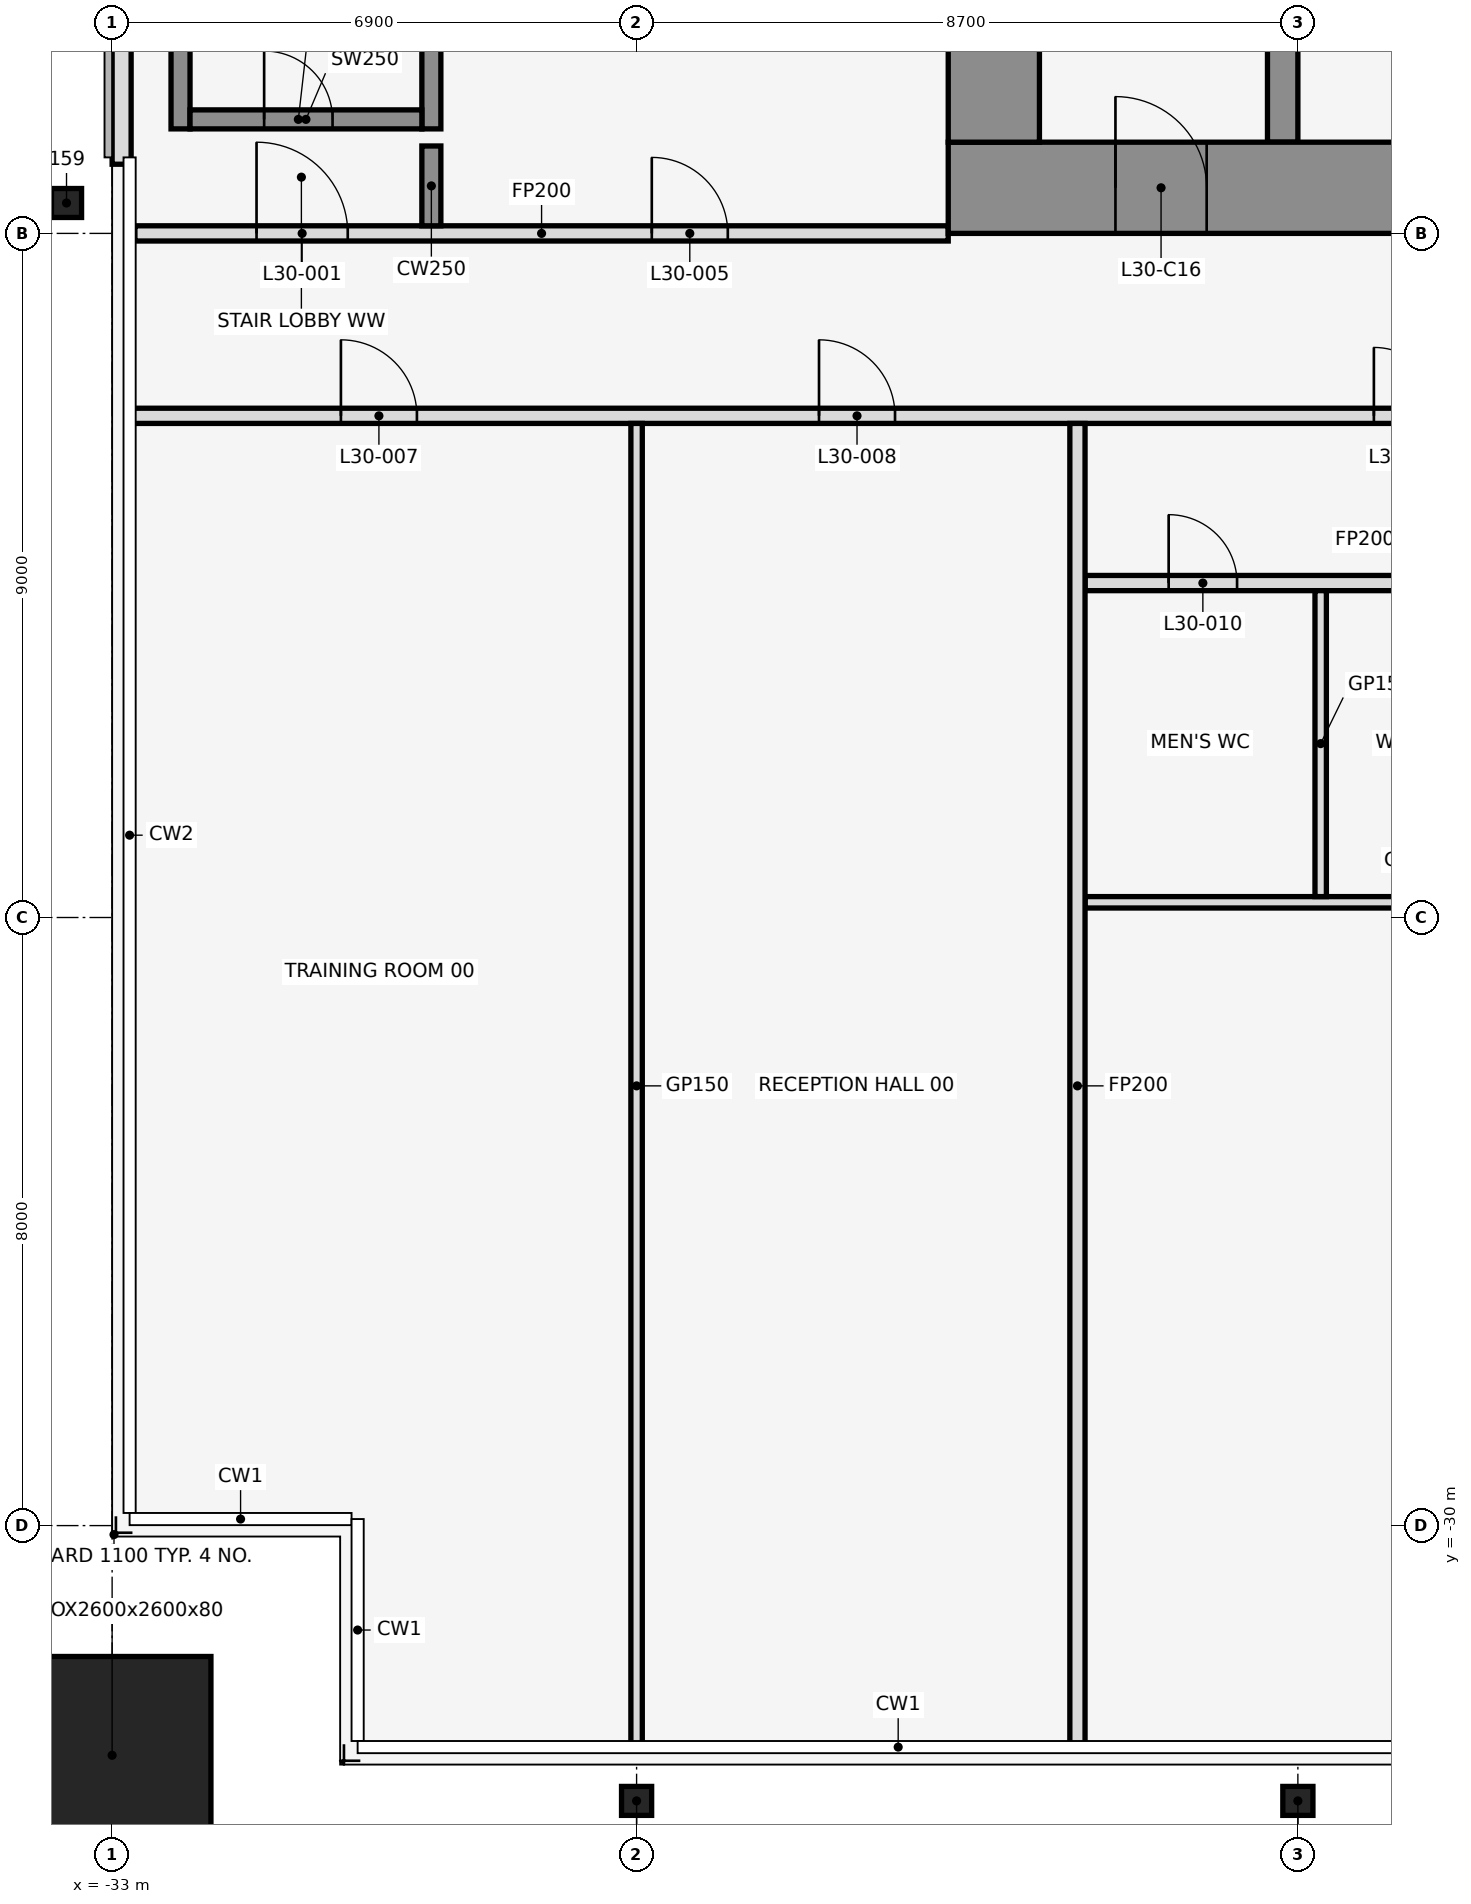
"""IFC4 building model, lengths in metres.
Left out: names, types, materials, properties, quantities, classifications, styles, units other than length and angle.
Written with IfcOpenShell. Run it as: python <this file> out.ifc"""

import sys

from ifc_helpers import new_model, si_unit, direction, frame, frame_2d, origin, origin_2d, place, context, subcontext, project, spatial, rectangle, hollow_rectangle, i_section, extrude, element, fill, save


model = new_model("IFC4")
c1 = context("Model", 3, precision=1e-05, world=origin(), true_north=direction((0.0, 1.0)))
c2 = subcontext(c1, "Body", "Model", "MODEL_VIEW")
j1 = project(units=[si_unit("LENGTHUNIT", "METRE"), si_unit("PLANEANGLEUNIT", "RADIAN")], contexts=[c1])
p1 = place(None, origin())
s1 = spatial("IfcSite", under=j1, at=p1, CompositionType="ELEMENT")
p2 = place(p1, origin())
s2 = spatial("IfcBuilding", under=s1, at=p2, CompositionType="ELEMENT")
p3 = place(p2, frame((0.0, 0.0, 140.4)))
s3 = spatial("IfcBuildingStorey", under=s2, at=p3, CompositionType="ELEMENT", Elevation=140.4)
p4 = place(p3, frame((-33.0, -33.022, 0.0), z_axis=(0.0, 0.0, 1.0), x_axis=(1.0, 0.0, 0.0)))
e1 = element("IfcColumn", 1, at=p4, inside=s3, PredefinedType="COLUMN", context=c2, shape_type="SweptSolid", body=[
    extrude(hollow_rectangle(XDim=2.6, YDim=2.6, WallThickness=0.08, at=origin_2d()), origin(), (0.0, 0.0, 1.0), 4.1),
])
for number, where, z_axis, x_axis in (
    (2, (-26.1, -33.622, 0.0), (0.0, 0.0, 1.0), (1.0, 0.0, 0.0)),
    (3, (-17.4, -33.622, 0.0), (0.0, 0.0, 1.0), (1.0, 0.0, 0.0)),
    (4, (-33.6, -12.6, 0.0), (0.0, 0.0, 1.0), (1.0, 0.0, 0.0)),
):
    element("IfcColumn", number, at=place(p3, frame(where, z_axis=z_axis, x_axis=x_axis)), inside=s3, PredefinedType="COLUMN", context=c2, shape_type="SweptSolid", body=[
        extrude(i_section(OverallWidth=0.396, OverallDepth=0.381, WebThickness=0.019, FlangeThickness=0.03, at=origin_2d()), origin(), (0.0, 0.0, 1.0), 4.1),
    ])
p5 = place(p3, frame((-32.875, -6.0, 0.0), z_axis=(0.0, 0.0, 1.0), x_axis=(0.0, -1.0, 0.0)))
e5 = element("IfcWall", 5, at=p5, inside=s3, PredefinedType="STANDARD", context=c2, shape_type="SweptSolid", body=[
    extrude(rectangle(XDim=6.09, YDim=0.25, at=frame_2d((3.045, 0.0))), origin(), (0.0, 0.0, 1.0), 3.95),
])
p6 = place(p3, frame((-32.1, -11.625, 0.0), z_axis=(0.0, 0.0, 1.0), x_axis=(0.0, 1.0, 0.0)))
e6 = element("IfcWall", 6, at=p6, inside=s3, PredefinedType="SHEAR", context=c2, shape_type="SweptSolid", body=[
    extrude(rectangle(XDim=7.325, YDim=0.25, at=frame_2d((3.663, 0.0))), origin(), (0.0, 0.0, 1.0), 4.1),
])
p7 = place(p3, frame((-28.8, -11.625, 0.0), z_axis=(0.0, 0.0, 1.0), x_axis=(0.0, 1.0, 0.0)))
e7 = element("IfcWall", 7, at=p7, inside=s3, PredefinedType="SHEAR", context=c2, shape_type="SweptSolid", body=[
    extrude(rectangle(XDim=7.25, YDim=0.25, at=frame_2d((3.625, 0.0))), origin(), (0.0, 0.0, 1.0), 4.1),
])
p8 = place(p3, frame((-31.975, -11.5, 0.0), z_axis=(0.0, 0.0, 1.0), x_axis=(1.0, 0.0, 0.0)))
e8 = element("IfcWall", 8, at=p8, inside=s3, PredefinedType="SHEAR", context=c2, shape_type="SweptSolid", body=[
    extrude(rectangle(XDim=3.05, YDim=0.25, at=frame_2d((1.525, 0.0))), origin(), (0.0, 0.0, 1.0), 4.1),
])
p9 = place(p8, frame((0.975, 0.0, 0.0)))
e9 = element("IfcOpeningElement", 9, at=p9, cuts=e8, PredefinedType="OPENING", context=c2, shape_type="SweptSolid", body=[
    extrude(rectangle(XDim=0.9, YDim=2.1, at=frame_2d((0.45, 1.05))), frame((0.0, 0.137, 0.0), z_axis=(0.0, -1.0, 0.0), x_axis=(1.0, 0.0, 0.0)), (0.0, 0.0, 1.0), 0.274),
])
p10 = place(p3, frame((-20.2, -21.8, 0.0), z_axis=(0.0, 0.0, 1.0), x_axis=(1.0, 0.0, 0.0)))
e10 = element("IfcWall", 10, at=p10, inside=s3, PredefinedType="PARTITIONING", context=c2, shape_type="SweptSolid", body=[
    extrude(rectangle(XDim=8.7, YDim=0.15, at=frame_2d((4.35, 0.0))), origin(), (0.0, 0.0, 1.0), 2.939),
])
p11 = place(p3, frame((-20.2, -17.6, 0.0), z_axis=(0.0, 0.0, 1.0), x_axis=(1.0, 0.0, 0.0)))
e11 = element("IfcWall", 11, at=p11, inside=s3, PredefinedType="PARTITIONING", context=c2, shape_type="SweptSolid", body=[
    extrude(rectangle(XDim=8.5, YDim=0.2, at=frame_2d((4.25, 0.0))), origin(), (0.0, 0.0, 1.0), 2.939),
])
p12 = place(p11, frame((1.1, 0.0, 0.0)))
e12 = element("IfcOpeningElement", 12, at=p12, cuts=e11, PredefinedType="OPENING", context=c2, shape_type="SweptSolid", body=[
    extrude(rectangle(XDim=0.9, YDim=2.1, at=frame_2d((0.45, 1.05))), frame((0.0, 0.112, 0.0), z_axis=(0.0, -1.0, 0.0), x_axis=(1.0, 0.0, 0.0)), (0.0, 0.0, 1.0), 0.224),
])
p13 = place(p11, frame((4.3, 0.0, 0.0)))
e13 = element("IfcOpeningElement", 13, at=p13, cuts=e11, PredefinedType="OPENING", context=c2, shape_type="SweptSolid", body=[
    extrude(rectangle(XDim=0.9, YDim=2.1, at=frame_2d((0.45, 1.05))), frame((0.0, 0.112, 0.0), z_axis=(0.0, -1.0, 0.0), x_axis=(1.0, 0.0, 0.0)), (0.0, 0.0, 1.0), 0.224),
])
p14 = place(p11, frame((6.9, 0.0, 0.0)))
e14 = element("IfcOpeningElement", 14, at=p14, cuts=e11, PredefinedType="OPENING", context=c2, shape_type="SweptSolid", body=[
    extrude(rectangle(XDim=1.0, YDim=2.1, at=frame_2d((0.5, 1.05))), frame((0.0, 0.112, 0.0), z_axis=(0.0, -1.0, 0.0), x_axis=(1.0, 0.0, 0.0)), (0.0, 0.0, 1.0), 0.224),
])
p15 = place(p3, frame((-32.79, -15.4, 0.0), z_axis=(0.0, 0.0, 1.0), x_axis=(1.0, 0.0, 0.0)))
e15 = element("IfcWall", 15, at=p15, inside=s3, PredefinedType="PARTITIONING", context=c2, shape_type="SweptSolid", body=[
    extrude(rectangle(XDim=65.58, YDim=0.2, at=frame_2d((32.79, 0.0))), origin(), (0.0, 0.0, 1.0), 2.939),
])
p16 = place(p15, frame((2.8, 0.0, 0.0)))
e16 = element("IfcOpeningElement", 16, at=p16, cuts=e15, PredefinedType="OPENING", context=c2, shape_type="SweptSolid", body=[
    extrude(rectangle(XDim=1.0, YDim=2.1, at=frame_2d((0.5, 1.05))), frame((0.0, 0.112, 0.0), z_axis=(0.0, -1.0, 0.0), x_axis=(1.0, 0.0, 0.0)), (0.0, 0.0, 1.0), 0.224),
])
p17 = place(p15, frame((9.09, 0.0, 0.0)))
e17 = element("IfcOpeningElement", 17, at=p17, cuts=e15, PredefinedType="OPENING", context=c2, shape_type="SweptSolid", body=[
    extrude(rectangle(XDim=1.0, YDim=2.1, at=frame_2d((0.5, 1.05))), frame((0.0, 0.112, 0.0), z_axis=(0.0, -1.0, 0.0), x_axis=(1.0, 0.0, 0.0)), (0.0, 0.0, 1.0), 0.224),
])
p18 = place(p15, frame((16.39, 0.0, 0.0)))
e18 = element("IfcOpeningElement", 18, at=p18, cuts=e15, PredefinedType="OPENING", context=c2, shape_type="SweptSolid", body=[
    extrude(rectangle(XDim=0.9, YDim=2.1, at=frame_2d((0.45, 1.05))), frame((0.0, 0.112, 0.0), z_axis=(0.0, -1.0, 0.0), x_axis=(1.0, 0.0, 0.0)), (0.0, 0.0, 1.0), 0.224),
])
p19 = place(p15, frame((27.89, 0.0, 0.0)))
e19 = element("IfcOpeningElement", 19, at=p19, cuts=e15, PredefinedType="OPENING", context=c2, shape_type="SweptSolid", body=[
    extrude(rectangle(XDim=1.0, YDim=2.1, at=frame_2d((0.5, 1.05))), frame((0.0, 0.112, 0.0), z_axis=(0.0, -1.0, 0.0), x_axis=(1.0, 0.0, 0.0)), (0.0, 0.0, 1.0), 0.224),
])
p20 = place(p15, frame((38.09, 0.0, 0.0)))
e20 = element("IfcOpeningElement", 20, at=p20, cuts=e15, PredefinedType="OPENING", context=c2, shape_type="SweptSolid", body=[
    extrude(rectangle(XDim=1.0, YDim=2.1, at=frame_2d((0.5, 1.05))), frame((0.0, 0.112, 0.0), z_axis=(0.0, -1.0, 0.0), x_axis=(1.0, 0.0, 0.0)), (0.0, 0.0, 1.0), 0.224),
])
p21 = place(p15, frame((45.39, 0.0, 0.0)))
e21 = element("IfcOpeningElement", 21, at=p21, cuts=e15, PredefinedType="OPENING", context=c2, shape_type="SweptSolid", body=[
    extrude(rectangle(XDim=1.0, YDim=2.1, at=frame_2d((0.5, 1.05))), frame((0.0, 0.112, 0.0), z_axis=(0.0, -1.0, 0.0), x_axis=(1.0, 0.0, 0.0)), (0.0, 0.0, 1.0), 0.224),
])
p22 = place(p15, frame((53.69, 0.0, 0.0)))
e22 = element("IfcOpeningElement", 22, at=p22, cuts=e15, PredefinedType="OPENING", context=c2, shape_type="SweptSolid", body=[
    extrude(rectangle(XDim=1.8, YDim=2.1, at=frame_2d((0.9, 1.05))), frame((0.0, 0.112, 0.0), z_axis=(0.0, -1.0, 0.0), x_axis=(1.0, 0.0, 0.0)), (0.0, 0.0, 1.0), 0.224),
])
p23 = place(p15, frame((61.69, 0.0, 0.0)))
e23 = element("IfcOpeningElement", 23, at=p23, cuts=e15, PredefinedType="OPENING", context=c2, shape_type="SweptSolid", body=[
    extrude(rectangle(XDim=1.0, YDim=2.1, at=frame_2d((0.5, 1.05))), frame((0.0, 0.112, 0.0), z_axis=(0.0, -1.0, 0.0), x_axis=(1.0, 0.0, 0.0)), (0.0, 0.0, 1.0), 0.224),
])
p24 = place(p3, frame((-32.7, -13.0, 0.0), z_axis=(0.0, 0.0, 1.0), x_axis=(1.0, 0.0, 0.0)))
e24 = element("IfcWall", 24, at=p24, inside=s3, PredefinedType="PARTITIONING", context=c2, shape_type="SweptSolid", body=[
    extrude(rectangle(XDim=10.7, YDim=0.2, at=frame_2d((5.35, 0.0))), origin(), (0.0, 0.0, 1.0), 2.939),
])
p25 = place(p24, frame((1.6, 0.0, 0.0)))
e25 = element("IfcOpeningElement", 25, at=p25, cuts=e24, PredefinedType="OPENING", context=c2, shape_type="SweptSolid", body=[
    extrude(rectangle(XDim=1.2, YDim=2.1, at=frame_2d((0.6, 1.05))), frame((0.0, 0.112, 0.0), z_axis=(0.0, -1.0, 0.0), x_axis=(1.0, 0.0, 0.0)), (0.0, 0.0, 1.0), 0.224),
])
p26 = place(p24, frame((6.8, 0.0, 0.0)))
e26 = element("IfcOpeningElement", 26, at=p26, cuts=e24, PredefinedType="OPENING", context=c2, shape_type="SweptSolid", body=[
    extrude(rectangle(XDim=1.0, YDim=2.1, at=frame_2d((0.5, 1.05))), frame((0.0, 0.112, 0.0), z_axis=(0.0, -1.0, 0.0), x_axis=(1.0, 0.0, 0.0)), (0.0, 0.0, 1.0), 0.224),
])
p27 = place(p3, frame((-28.8, -12.9, 0.0), z_axis=(0.0, 0.0, 1.0), x_axis=(0.0, 1.0, 0.0)))
e27 = element("IfcWall", 27, at=p27, inside=s3, PredefinedType="SHEAR", context=c2, shape_type="SweptSolid", body=[
    extrude(rectangle(XDim=1.05, YDim=0.25, at=frame_2d((0.525, 0.0))), origin(), (0.0, 0.0, 1.0), 4.1),
])
p28 = place(p3, frame((-26.1, -32.93, 0.0), z_axis=(0.0, 0.0, 1.0), x_axis=(0.0, 1.0, 0.0)))
e28 = element("IfcWall", 28, at=p28, inside=s3, PredefinedType="PARTITIONING", context=c2, shape_type="SweptSolid", body=[
    extrude(rectangle(XDim=17.43, YDim=0.15, at=frame_2d((8.715, 0.0))), origin(), (0.0, 0.0, 1.0), 2.939),
])
p29 = place(p3, frame((-20.3, -32.93, 0.0), z_axis=(0.0, 0.0, 1.0), x_axis=(0.0, 1.0, 0.0)))
e29 = element("IfcWall", 29, at=p29, inside=s3, PredefinedType="PARTITIONING", context=c2, shape_type="SweptSolid", body=[
    extrude(rectangle(XDim=17.43, YDim=0.2, at=frame_2d((8.715, 0.0))), origin(), (0.0, 0.0, 1.0), 2.939),
])
p30 = place(p3, frame((-17.1, -21.725, 0.0), z_axis=(0.0, 0.0, 1.0), x_axis=(0.0, 1.0, 0.0)))
e30 = element("IfcWall", 30, at=p30, inside=s3, PredefinedType="PARTITIONING", context=c2, shape_type="SweptSolid", body=[
    extrude(rectangle(XDim=4.025, YDim=0.15, at=frame_2d((2.013, 0.0))), origin(), (0.0, 0.0, 1.0), 2.939),
])
p31 = place(p3, frame((-17.6, -11.8, 0.0), z_axis=(0.0, 0.0, 1.0), x_axis=(0.0, 1.0, 0.0)))
e31 = element("IfcWall", 31, at=p31, inside=s3, PredefinedType="SHEAR", context=c2, shape_type="SweptSolid", body=[
    extrude(rectangle(XDim=10.6, YDim=0.4, at=frame_2d((5.3, 0.0))), origin(), (0.0, 0.0, 1.0), 4.1),
])
p32 = place(p31, frame((1.25, 0.0, 0.0)))
e32 = element("IfcOpeningElement", 32, at=p32, cuts=e31, PredefinedType="OPENING", context=c2, shape_type="SweptSolid", body=[
    extrude(rectangle(XDim=1.1, YDim=2.1, at=frame_2d((0.55, 1.05))), frame((0.0, 0.212, 0.0), z_axis=(0.0, -1.0, 0.0), x_axis=(1.0, 0.0, 0.0)), (0.0, 0.0, 1.0), 0.424),
])
p33 = place(p31, frame((3.95, 0.0, 0.0)))
e33 = element("IfcOpeningElement", 33, at=p33, cuts=e31, PredefinedType="OPENING", context=c2, shape_type="SweptSolid", body=[
    extrude(rectangle(XDim=1.1, YDim=2.1, at=frame_2d((0.55, 1.05))), frame((0.0, 0.212, 0.0), z_axis=(0.0, -1.0, 0.0), x_axis=(1.0, 0.0, 0.0)), (0.0, 0.0, 1.0), 0.424),
])
p34 = place(p3, frame((-22.0, -12.4, 0.0), z_axis=(0.0, 0.0, 1.0), x_axis=(1.0, 0.0, 0.0)))
e34 = element("IfcWall", 34, at=p34, inside=s3, PredefinedType="SHEAR", context=c2, shape_type="SweptSolid", body=[
    extrude(rectangle(XDim=44.0, YDim=1.2, at=frame_2d((22.0, 0.0))), origin(), (0.0, 0.0, 1.0), 4.1),
])
p35 = place(p34, frame((2.2, 0.0, 0.0)))
e35 = element("IfcOpeningElement", 35, at=p35, cuts=e34, PredefinedType="OPENING", context=c2, shape_type="SweptSolid", body=[
    extrude(rectangle(XDim=1.2, YDim=2.1, at=frame_2d((0.6, 1.05))), frame((0.0, 0.612, 0.0), z_axis=(0.0, -1.0, 0.0), x_axis=(1.0, 0.0, 0.0)), (0.0, 0.0, 1.0), 1.224),
])
p36 = place(p34, frame((21.4, 0.0, 0.0)))
e36 = element("IfcOpeningElement", 36, at=p36, cuts=e34, PredefinedType="OPENING", context=c2, shape_type="SweptSolid", body=[
    extrude(rectangle(XDim=1.2, YDim=2.1, at=frame_2d((0.6, 1.05))), frame((0.0, 0.612, 0.0), z_axis=(0.0, -1.0, 0.0), x_axis=(1.0, 0.0, 0.0)), (0.0, 0.0, 1.0), 1.224),
])
p37 = place(p34, frame((40.6, 0.0, 0.0)))
e37 = element("IfcOpeningElement", 37, at=p37, cuts=e34, PredefinedType="OPENING", context=c2, shape_type="SweptSolid", body=[
    extrude(rectangle(XDim=1.2, YDim=2.1, at=frame_2d((0.6, 1.05))), frame((0.0, 0.612, 0.0), z_axis=(0.0, -1.0, 0.0), x_axis=(1.0, 0.0, 0.0)), (0.0, 0.0, 1.0), 1.224),
])
p38 = place(p34, frame((16.0, 0.0, 0.0)))
e38 = element("IfcOpeningElement", 38, at=p38, cuts=e34, PredefinedType="OPENING", context=c2, shape_type="SweptSolid", body=[
    extrude(rectangle(XDim=1.8, YDim=2.1, at=frame_2d((0.9, 1.05))), frame((0.0, 0.612, 0.0), z_axis=(0.0, -1.0, 0.0), x_axis=(1.0, 0.0, 0.0)), (0.0, 0.0, 1.0), 1.224),
])
p39 = place(p34, frame((6.3, 0.0, 0.0)))
e39 = element("IfcOpeningElement", 39, at=p39, cuts=e34, PredefinedType="OPENING", context=c2, shape_type="SweptSolid", body=[
    extrude(rectangle(XDim=1.2, YDim=2.1, at=frame_2d((0.6, 1.05))), frame((0.0, 0.612, 0.0), z_axis=(0.0, -1.0, 0.0), x_axis=(1.0, 0.0, 0.0)), (0.0, 0.0, 1.0), 1.224),
])
p40 = place(p34, frame((26.2, 0.0, 0.0)))
e40 = element("IfcOpeningElement", 40, at=p40, cuts=e34, PredefinedType="OPENING", context=c2, shape_type="SweptSolid", body=[
    extrude(rectangle(XDim=1.8, YDim=2.1, at=frame_2d((0.9, 1.05))), frame((0.0, 0.612, 0.0), z_axis=(0.0, -1.0, 0.0), x_axis=(1.0, 0.0, 0.0)), (0.0, 0.0, 1.0), 1.224),
])
p41 = place(p34, frame((36.5, 0.0, 0.0)))
e41 = element("IfcOpeningElement", 41, at=p41, cuts=e34, PredefinedType="OPENING", context=c2, shape_type="SweptSolid", body=[
    extrude(rectangle(XDim=1.2, YDim=2.1, at=frame_2d((0.6, 1.05))), frame((0.0, 0.612, 0.0), z_axis=(0.0, -1.0, 0.0), x_axis=(1.0, 0.0, 0.0)), (0.0, 0.0, 1.0), 1.224),
])
p42 = place(p3, frame((-21.4, -11.8, 0.0), z_axis=(0.0, 0.0, 1.0), x_axis=(0.0, 1.0, 0.0)))
e42 = element("IfcWall", 42, at=p42, inside=s3, PredefinedType="SHEAR", context=c2, shape_type="SweptSolid", body=[
    extrude(rectangle(XDim=10.6, YDim=1.2, at=frame_2d((5.3, 0.0))), origin(), (0.0, 0.0, 1.0), 4.1),
])
p43 = place(p25, origin())
e43 = element("IfcDoor", 43, at=p43, inside=s3, OperationType="SINGLE_SWING_LEFT", PredefinedType="DOOR", context=c2, shape_type="SweptSolid", body=[
    extrude(rectangle(XDim=1.2, YDim=2.1, at=frame_2d((0.6, 1.05))), frame((0.0, 0.025, 0.0), z_axis=(0.0, -1.0, 0.0), x_axis=(1.0, 0.0, 0.0)), (0.0, 0.0, 1.0), 0.05),
])
fill(e25, e43)
p44 = place(p9, origin())
e44 = element("IfcDoor", 44, at=p44, inside=s3, OperationType="SINGLE_SWING_LEFT", PredefinedType="DOOR", context=c2, shape_type="SweptSolid", body=[
    extrude(rectangle(XDim=0.9, YDim=2.1, at=frame_2d((0.45, 1.05))), frame((0.0, 0.025, 0.0), z_axis=(0.0, -1.0, 0.0), x_axis=(1.0, 0.0, 0.0)), (0.0, 0.0, 1.0), 0.05),
])
fill(e9, e44)
p45 = place(p26, origin())
e45 = element("IfcDoor", 45, at=p45, inside=s3, OperationType="SINGLE_SWING_LEFT", PredefinedType="DOOR", context=c2, shape_type="SweptSolid", body=[
    extrude(rectangle(XDim=1.0, YDim=2.1, at=frame_2d((0.5, 1.05))), frame((0.0, 0.025, 0.0), z_axis=(0.0, -1.0, 0.0), x_axis=(1.0, 0.0, 0.0)), (0.0, 0.0, 1.0), 0.05),
])
fill(e26, e45)
p46 = place(p16, frame((1.0, 0.0, 0.0), z_axis=(0.0, 0.0, 1.0), x_axis=(-1.0, 0.0, 0.0)))
e46 = element("IfcDoor", 46, at=p46, inside=s3, OperationType="SINGLE_SWING_LEFT", PredefinedType="DOOR", context=c2, shape_type="SweptSolid", body=[
    extrude(rectangle(XDim=1.0, YDim=2.1, at=frame_2d((0.5, 1.05))), frame((0.0, 0.025, 0.0), z_axis=(0.0, -1.0, 0.0), x_axis=(1.0, 0.0, 0.0)), (0.0, 0.0, 1.0), 0.05),
])
fill(e16, e46)
p47 = place(p17, frame((1.0, 0.0, 0.0), z_axis=(0.0, 0.0, 1.0), x_axis=(-1.0, 0.0, 0.0)))
e47 = element("IfcDoor", 47, at=p47, inside=s3, OperationType="SINGLE_SWING_RIGHT", PredefinedType="DOOR", context=c2, shape_type="SweptSolid", body=[
    extrude(rectangle(XDim=1.0, YDim=2.1, at=frame_2d((0.5, 1.05))), frame((0.0, 0.025, 0.0), z_axis=(0.0, -1.0, 0.0), x_axis=(1.0, 0.0, 0.0)), (0.0, 0.0, 1.0), 0.05),
])
fill(e17, e47)
p48 = place(p18, frame((0.9, 0.0, 0.0), z_axis=(0.0, 0.0, 1.0), x_axis=(-1.0, 0.0, 0.0)))
e48 = element("IfcDoor", 48, at=p48, inside=s3, OperationType="SINGLE_SWING_RIGHT", PredefinedType="DOOR", context=c2, shape_type="SweptSolid", body=[
    extrude(rectangle(XDim=0.9, YDim=2.1, at=frame_2d((0.45, 1.05))), frame((0.0, 0.025, 0.0), z_axis=(0.0, -1.0, 0.0), x_axis=(1.0, 0.0, 0.0)), (0.0, 0.0, 1.0), 0.05),
])
fill(e18, e48)
p49 = place(p12, frame((0.9, 0.0, 0.0), z_axis=(0.0, 0.0, 1.0), x_axis=(-1.0, 0.0, 0.0)))
e49 = element("IfcDoor", 49, at=p49, inside=s3, OperationType="SINGLE_SWING_LEFT", PredefinedType="DOOR", context=c2, shape_type="SweptSolid", body=[
    extrude(rectangle(XDim=0.9, YDim=2.1, at=frame_2d((0.45, 1.05))), frame((0.0, 0.025, 0.0), z_axis=(0.0, -1.0, 0.0), x_axis=(1.0, 0.0, 0.0)), (0.0, 0.0, 1.0), 0.05),
])
fill(e12, e49)
p50 = place(p35, frame((1.2, 0.0, 0.0), z_axis=(0.0, 0.0, 1.0), x_axis=(-1.0, 0.0, 0.0)))
e50 = element("IfcDoor", 50, at=p50, inside=s3, OperationType="SINGLE_SWING_RIGHT", PredefinedType="DOOR", context=c2, shape_type="SweptSolid", body=[
    extrude(rectangle(XDim=1.2, YDim=2.1, at=frame_2d((0.6, 1.05))), frame((0.0, 0.025, 0.0), z_axis=(0.0, -1.0, 0.0), x_axis=(1.0, 0.0, 0.0)), (0.0, 0.0, 1.0), 0.05),
])
fill(e35, e50)
save(model, sys.argv[1])
